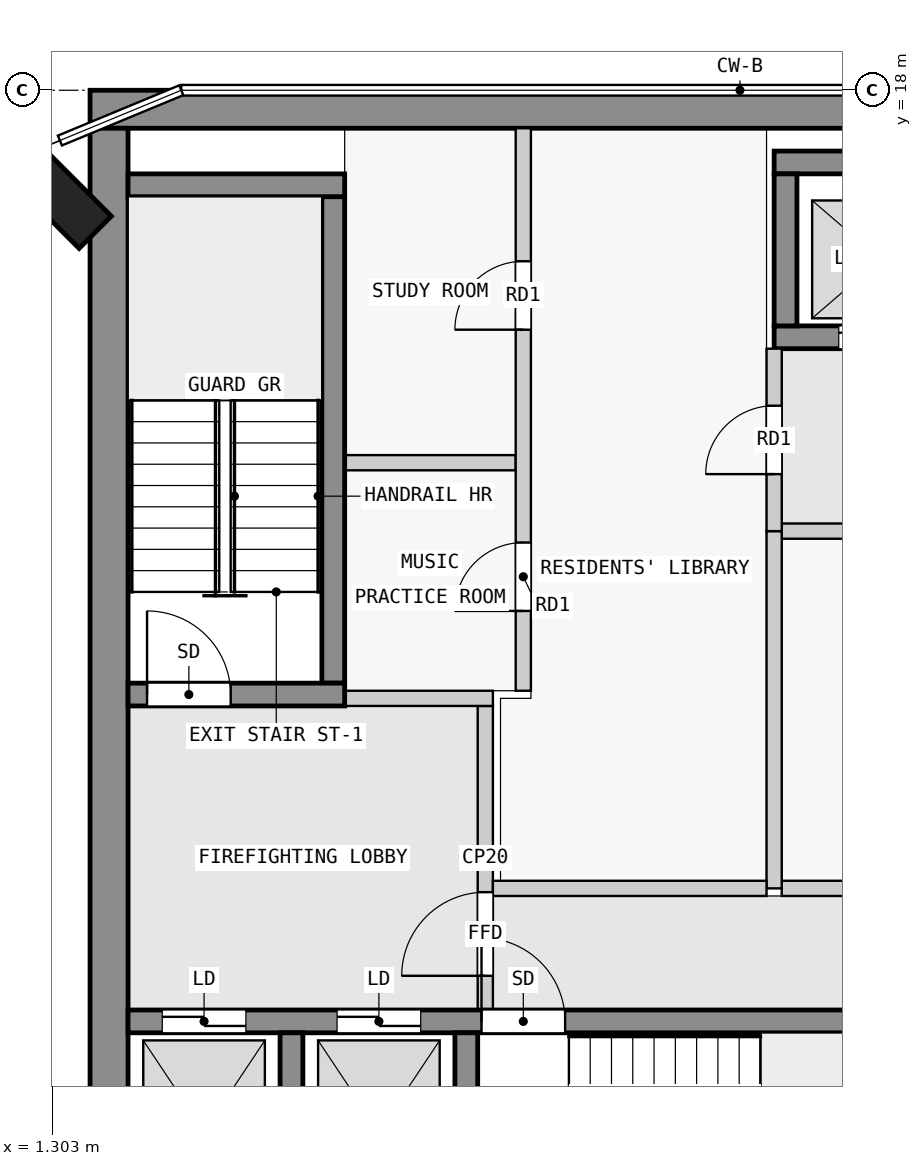
"""IFC4 building model, lengths in metres.
Left out: names, types, materials, properties, quantities, classifications, styles, units other than length and angle.
Written with IfcOpenShell. Run it as: python <this file> out.ifc"""

import sys

from ifc_helpers import new_model, si_unit, direction, frame, frame_2d, origin, origin_2d, place, context, subcontext, project, spatial, rectangle, extrude, element, fill, save


model = new_model("IFC4")
c1 = context("Model", 3, precision=1e-05, world=origin(), true_north=direction((0.0, 1.0)))
c2 = subcontext(c1, "Body", "Model", "MODEL_VIEW")
j1 = project(units=[si_unit("LENGTHUNIT", "METRE"), si_unit("PLANEANGLEUNIT", "RADIAN")], contexts=[c1])
p1 = place(None, origin())
s1 = spatial("IfcSite", under=j1, at=p1, CompositionType="ELEMENT")
p2 = place(p1, origin())
s2 = spatial("IfcBuilding", under=s1, at=p2, CompositionType="ELEMENT")
p3 = place(p2, frame((0.0, 0.0, 232.9)))
s3 = spatial("IfcBuildingStorey", under=s2, at=p3, CompositionType="ELEMENT", Elevation=232.9)
p4 = place(p3, frame((1.374, 16.626, 0.0), z_axis=(0.0, 0.0, 1.0), x_axis=(0.707106781187, 0.707106781187, 0.0)))
e1 = element("IfcColumn", 1, at=p4, inside=s3, PredefinedType="COLUMN", context=c2, shape_type="SweptSolid", body=[
    extrude(rectangle(XDim=0.6, YDim=1.4, at=origin_2d()), origin(), (0.0, 0.0, 1.0), 3.5),
])
p5 = place(p3, frame((1.8, 17.75, 0.0), z_axis=(0.0, 0.0, 1.0), x_axis=(1.0, 0.0, 0.0)))
e2 = element("IfcWall", 2, at=p5, inside=s3, PredefinedType="SHEAR", context=c2, shape_type="SweptSolid", body=[
    extrude(rectangle(XDim=20.7, YDim=0.5, at=frame_2d((10.35, 0.0))), origin(), (0.0, 0.0, 1.0), 3.2),
])
p6 = place(p3, frame((2.05, 2.5, 0.0), z_axis=(0.0, 0.0, 1.0), x_axis=(0.0, 1.0, 0.0)))
e3 = element("IfcWall", 3, at=p6, inside=s3, PredefinedType="SHEAR", context=c2, shape_type="SweptSolid", body=[
    extrude(rectangle(XDim=15.0, YDim=0.5, at=frame_2d((7.5, 0.0))), origin(), (0.0, 0.0, 1.0), 3.2),
])
for number, where, z_axis, x_axis in (
    (4, (4.45, 2.8, 0.0), (0.0, 0.0, 1.0), (0.0, 1.0, 0.0)),
    (5, (6.75, 2.8, 0.0), (0.0, 0.0, 1.0), (0.0, 1.0, 0.0)),
):
    element("IfcWall", number, at=place(p3, frame(where, z_axis=z_axis, x_axis=x_axis)), inside=s3, PredefinedType="SHEAR", context=c2, shape_type="SweptSolid", body=[
        extrude(rectangle(XDim=2.8, YDim=0.3, at=frame_2d((1.4, 0.0))), origin(), (0.0, 0.0, 1.0), 3.2),
    ])
p7 = place(p3, frame((2.3, 5.75, 0.0), z_axis=(0.0, 0.0, 1.0), x_axis=(1.0, 0.0, 0.0)))
e6 = element("IfcWall", 6, at=p7, inside=s3, PredefinedType="SHEAR", context=c2, shape_type="SweptSolid", body=[
    extrude(rectangle(XDim=18.8, YDim=0.3, at=frame_2d((9.4, 0.0))), origin(), (0.0, 0.0, 1.0), 3.2),
])
p8 = place(p7, frame((4.65, 0.0, 0.0)))
e7 = element("IfcOpeningElement", 7, at=p8, cuts=e6, PredefinedType="OPENING", context=c2, shape_type="SweptSolid", body=[
    extrude(rectangle(XDim=1.1, YDim=2.1, at=frame_2d((0.55, 1.05))), frame((0.0, 0.16, 0.0), z_axis=(0.0, -1.0, 0.0), x_axis=(1.0, 0.0, 0.0)), (0.0, 0.0, 1.0), 0.32),
])
p9 = place(p7, frame((0.45, 0.0, 0.0)))
e8 = element("IfcOpeningElement", 8, at=p9, cuts=e6, PredefinedType="OPENING", context=c2, shape_type="SweptSolid", body=[
    extrude(rectangle(XDim=1.1, YDim=2.1, at=frame_2d((0.55, 1.05))), frame((0.0, 0.16, 0.0), z_axis=(0.0, -1.0, 0.0), x_axis=(1.0, 0.0, 0.0)), (0.0, 0.0, 1.0), 0.32),
])
p10 = place(p7, frame((2.75, 0.0, 0.0)))
e9 = element("IfcOpeningElement", 9, at=p10, cuts=e6, PredefinedType="OPENING", context=c2, shape_type="SweptSolid", body=[
    extrude(rectangle(XDim=1.1, YDim=2.1, at=frame_2d((0.55, 1.05))), frame((0.0, 0.16, 0.0), z_axis=(0.0, -1.0, 0.0), x_axis=(1.0, 0.0, 0.0)), (0.0, 0.0, 1.0), 0.32),
])
p11 = place(p7, frame((11.95, 0.0, 0.0)))
e10 = element("IfcOpeningElement", 10, at=p11, cuts=e6, PredefinedType="OPENING", context=c2, shape_type="SweptSolid", body=[
    extrude(rectangle(XDim=0.9, YDim=2.1, at=frame_2d((0.45, 1.05))), frame((0.0, 0.16, 0.0), z_axis=(0.0, -1.0, 0.0), x_axis=(1.0, 0.0, 0.0)), (0.0, 0.0, 1.0), 0.32),
])
p12 = place(p7, frame((15.7, 0.0, 0.0)))
e11 = element("IfcOpeningElement", 11, at=p12, cuts=e6, PredefinedType="OPENING", context=c2, shape_type="SweptSolid", body=[
    extrude(rectangle(XDim=0.9, YDim=2.1, at=frame_2d((0.45, 1.05))), frame((0.0, 0.16, 0.0), z_axis=(0.0, -1.0, 0.0), x_axis=(1.0, 0.0, 0.0)), (0.0, 0.0, 1.0), 0.32),
])
p13 = place(p3, frame((2.3, 10.05, 0.0), z_axis=(0.0, 0.0, 1.0), x_axis=(1.0, 0.0, 0.0)))
e12 = element("IfcWall", 12, at=p13, inside=s3, PredefinedType="SHEAR", context=c2, shape_type="SweptSolid", body=[
    extrude(rectangle(XDim=2.85, YDim=0.3, at=frame_2d((1.425, 0.0))), origin(), (0.0, 0.0, 1.0), 3.2),
])
p14 = place(p13, frame((0.25, 0.0, 0.0)))
e13 = element("IfcOpeningElement", 13, at=p14, cuts=e12, PredefinedType="OPENING", context=c2, shape_type="SweptSolid", body=[
    extrude(rectangle(XDim=1.1, YDim=2.1, at=frame_2d((0.55, 1.05))), frame((0.0, 0.16, 0.0), z_axis=(0.0, -1.0, 0.0), x_axis=(1.0, 0.0, 0.0)), (0.0, 0.0, 1.0), 0.32),
])
p15 = place(p3, frame((5.0, 10.2, 0.0), z_axis=(0.0, 0.0, 1.0), x_axis=(0.0, 1.0, 0.0)))
e14 = element("IfcWall", 14, at=p15, inside=s3, PredefinedType="SHEAR", context=c2, shape_type="SweptSolid", body=[
    extrude(rectangle(XDim=6.4, YDim=0.3, at=frame_2d((3.2, 0.0))), origin(), (0.0, 0.0, 1.0), 3.2),
])
p16 = place(p3, frame((2.3, 16.75, 0.0), z_axis=(0.0, 0.0, 1.0), x_axis=(1.0, 0.0, 0.0)))
e15 = element("IfcWall", 15, at=p16, inside=s3, PredefinedType="SHEAR", context=c2, shape_type="SweptSolid", body=[
    extrude(rectangle(XDim=2.85, YDim=0.3, at=frame_2d((1.425, 0.0))), origin(), (0.0, 0.0, 1.0), 3.2),
])
p17 = place(p3, frame((10.8, 17.05, 0.0), z_axis=(0.0, 0.0, 1.0), x_axis=(1.0, 0.0, 0.0)))
e16 = element("IfcWall", 16, at=p17, inside=s3, PredefinedType="SHEAR", context=c2, shape_type="SweptSolid", body=[
    extrude(rectangle(XDim=7.8, YDim=0.3, at=frame_2d((3.9, 0.0))), origin(), (0.0, 0.0, 1.0), 3.2),
])
p18 = place(p3, frame((10.8, 14.75, 0.0), z_axis=(0.0, 0.0, 1.0), x_axis=(1.0, 0.0, 0.0)))
e17 = element("IfcWall", 17, at=p18, inside=s3, PredefinedType="SHEAR", context=c2, shape_type="SweptSolid", body=[
    extrude(rectangle(XDim=7.8, YDim=0.3, at=frame_2d((3.9, 0.0))), origin(), (0.0, 0.0, 1.0), 3.2),
])
p19 = place(p18, frame((0.85, 0.0, 0.0)))
e18 = element("IfcOpeningElement", 18, at=p19, cuts=e17, PredefinedType="OPENING", context=c2, shape_type="SweptSolid", body=[
    extrude(rectangle(XDim=1.1, YDim=2.1, at=frame_2d((0.55, 1.05))), frame((0.0, 0.16, 0.0), z_axis=(0.0, -1.0, 0.0), x_axis=(1.0, 0.0, 0.0)), (0.0, 0.0, 1.0), 0.32),
])
p20 = place(p18, frame((3.35, 0.0, 0.0)))
e19 = element("IfcOpeningElement", 19, at=p20, cuts=e17, PredefinedType="OPENING", context=c2, shape_type="SweptSolid", body=[
    extrude(rectangle(XDim=1.1, YDim=2.1, at=frame_2d((0.55, 1.05))), frame((0.0, 0.16, 0.0), z_axis=(0.0, -1.0, 0.0), x_axis=(1.0, 0.0, 0.0)), (0.0, 0.0, 1.0), 0.32),
])
p21 = place(p18, frame((5.85, 0.0, 0.0)))
e20 = element("IfcOpeningElement", 20, at=p21, cuts=e17, PredefinedType="OPENING", context=c2, shape_type="SweptSolid", body=[
    extrude(rectangle(XDim=1.1, YDim=2.1, at=frame_2d((0.55, 1.05))), frame((0.0, 0.16, 0.0), z_axis=(0.0, -1.0, 0.0), x_axis=(1.0, 0.0, 0.0)), (0.0, 0.0, 1.0), 0.32),
])
p22 = place(p3, frame((10.95, 14.9, 0.0), z_axis=(0.0, 0.0, 1.0), x_axis=(0.0, 1.0, 0.0)))
e21 = element("IfcWall", 21, at=p22, inside=s3, PredefinedType="SHEAR", context=c2, shape_type="SweptSolid", body=[
    extrude(rectangle(XDim=2.0, YDim=0.3, at=frame_2d((1.0, 0.0))), origin(), (0.0, 0.0, 1.0), 3.2),
])
p23 = place(p3, frame((7.0, 5.9, 0.0), z_axis=(0.0, 0.0, 1.0), x_axis=(0.0, 1.0, 0.0)))
e22 = element("IfcWall", 22, at=p23, inside=s3, PredefinedType="PARTITIONING", context=c2, shape_type="SweptSolid", body=[
    extrude(rectangle(XDim=4.0, YDim=0.2, at=frame_2d((2.0, 0.0))), origin(), (0.0, 0.0, 1.0), 3.2),
])
p24 = place(p23, frame((0.45, 0.0, 0.0)))
e23 = element("IfcOpeningElement", 23, at=p24, cuts=e22, PredefinedType="OPENING", context=c2, shape_type="SweptSolid", body=[
    extrude(rectangle(XDim=1.1, YDim=2.1, at=frame_2d((0.55, 1.05))), frame((0.0, 0.11, 0.0), z_axis=(0.0, -1.0, 0.0), x_axis=(1.0, 0.0, 0.0)), (0.0, 0.0, 1.0), 0.22),
])
p25 = place(p3, frame((5.15, 10.0, 0.0), z_axis=(0.0, 0.0, 1.0), x_axis=(1.0, 0.0, 0.0)))
e24 = element("IfcWall", 24, at=p25, inside=s3, PredefinedType="PARTITIONING", context=c2, shape_type="SweptSolid", body=[
    extrude(rectangle(XDim=1.95, YDim=0.2, at=frame_2d((0.975, 0.0))), origin(), (0.0, 0.0, 1.0), 3.2),
])
p26 = place(p3, frame((7.1, 7.5, 0.0), z_axis=(0.0, 0.0, 1.0), x_axis=(1.0, 0.0, 0.0)))
e25 = element("IfcWall", 25, at=p26, inside=s3, PredefinedType="PARTITIONING", context=c2, shape_type="SweptSolid", body=[
    extrude(rectangle(XDim=3.6, YDim=0.2, at=frame_2d((1.8, 0.0))), origin(), (0.0, 0.0, 1.0), 3.2),
])
p27 = place(p3, frame((10.8, 12.2, 0.0), z_axis=(0.0, 0.0, 1.0), x_axis=(0.0, 1.0, 0.0)))
e26 = element("IfcWall", 26, at=p27, inside=s3, PredefinedType="PARTITIONING", context=c2, shape_type="SweptSolid", body=[
    extrude(rectangle(XDim=2.4, YDim=0.2, at=frame_2d((1.2, 0.0))), origin(), (0.0, 0.0, 1.0), 3.2),
])
p28 = place(p27, frame((0.75, 0.0, 0.0)))
e27 = element("IfcOpeningElement", 27, at=p28, cuts=e26, PredefinedType="OPENING", context=c2, shape_type="SweptSolid", body=[
    extrude(rectangle(XDim=0.9, YDim=2.1, at=frame_2d((0.45, 1.05))), frame((0.0, 0.11, 0.0), z_axis=(0.0, -1.0, 0.0), x_axis=(1.0, 0.0, 0.0)), (0.0, 0.0, 1.0), 0.22),
])
p29 = place(p3, frame((10.8, 7.5, 0.0), z_axis=(0.0, 0.0, 1.0), x_axis=(0.0, 1.0, 0.0)))
e28 = element("IfcWall", 28, at=p29, inside=s3, PredefinedType="PARTITIONING", context=c2, shape_type="SweptSolid", body=[
    extrude(rectangle(XDim=4.7, YDim=0.2, at=frame_2d((2.35, 0.0))), origin(), (0.0, 0.0, 1.0), 3.2),
])
p30 = place(p3, frame((10.9, 7.5, 0.0), z_axis=(0.0, 0.0, 1.0), x_axis=(1.0, 0.0, 0.0)))
e29 = element("IfcWall", 29, at=p30, inside=s3, PredefinedType="PARTITIONING", context=c2, shape_type="SweptSolid", body=[
    extrude(rectangle(XDim=8.6, YDim=0.2, at=frame_2d((4.3, 0.0))), origin(), (0.0, 0.0, 1.0), 3.2),
])
p31 = place(p3, frame((10.9, 12.2, 0.0), z_axis=(0.0, 0.0, 1.0), x_axis=(1.0, 0.0, 0.0)))
e30 = element("IfcWall", 30, at=p31, inside=s3, PredefinedType="PARTITIONING", context=c2, shape_type="SweptSolid", body=[
    extrude(rectangle(XDim=8.6, YDim=0.2, at=frame_2d((4.3, 0.0))), origin(), (0.0, 0.0, 1.0), 3.2),
])
p32 = place(p31, frame((1.425, 0.0, 0.0)))
e31 = element("IfcOpeningElement", 31, at=p32, cuts=e30, PredefinedType="OPENING", context=c2, shape_type="SweptSolid", body=[
    extrude(rectangle(XDim=0.9, YDim=2.1, at=frame_2d((0.45, 1.05))), frame((0.0, 0.11, 0.0), z_axis=(0.0, -1.0, 0.0), x_axis=(1.0, 0.0, 0.0)), (0.0, 0.0, 1.0), 0.22),
])
p33 = place(p31, frame((5.825, 0.0, 0.0)))
e32 = element("IfcOpeningElement", 32, at=p33, cuts=e30, PredefinedType="OPENING", context=c2, shape_type="SweptSolid", body=[
    extrude(rectangle(XDim=0.9, YDim=2.1, at=frame_2d((0.45, 1.05))), frame((0.0, 0.11, 0.0), z_axis=(0.0, -1.0, 0.0), x_axis=(1.0, 0.0, 0.0)), (0.0, 0.0, 1.0), 0.22),
])
p34 = place(p3, frame((7.5, 10.1, 0.0), z_axis=(0.0, 0.0, 1.0), x_axis=(0.0, 1.0, 0.0)))
e33 = element("IfcWall", 33, at=p34, inside=s3, PredefinedType="PARTITIONING", context=c2, shape_type="SweptSolid", body=[
    extrude(rectangle(XDim=7.4, YDim=0.2, at=frame_2d((3.7, 0.0))), origin(), (0.0, 0.0, 1.0), 3.2),
])
p35 = place(p34, frame((1.05, 0.0, 0.0)))
e34 = element("IfcOpeningElement", 34, at=p35, cuts=e33, PredefinedType="OPENING", context=c2, shape_type="SweptSolid", body=[
    extrude(rectangle(XDim=0.9, YDim=2.1, at=frame_2d((0.45, 1.05))), frame((0.0, 0.11, 0.0), z_axis=(0.0, -1.0, 0.0), x_axis=(1.0, 0.0, 0.0)), (0.0, 0.0, 1.0), 0.22),
])
p36 = place(p34, frame((4.75, 0.0, 0.0)))
e35 = element("IfcOpeningElement", 35, at=p36, cuts=e33, PredefinedType="OPENING", context=c2, shape_type="SweptSolid", body=[
    extrude(rectangle(XDim=0.9, YDim=2.1, at=frame_2d((0.45, 1.05))), frame((0.0, 0.11, 0.0), z_axis=(0.0, -1.0, 0.0), x_axis=(1.0, 0.0, 0.0)), (0.0, 0.0, 1.0), 0.22),
])
p37 = place(p3, frame((5.15, 13.1, 0.0), z_axis=(0.0, 0.0, 1.0), x_axis=(1.0, 0.0, 0.0)))
e36 = element("IfcWall", 36, at=p37, inside=s3, PredefinedType="PARTITIONING", context=c2, shape_type="SweptSolid", body=[
    extrude(rectangle(XDim=2.25, YDim=0.2, at=frame_2d((1.125, 0.0))), origin(), (0.0, 0.0, 1.0), 3.2),
])
p38 = place(p24, origin())
e37 = element("IfcDoor", 37, at=p38, inside=s3, OperationType="SINGLE_SWING_LEFT", PredefinedType="DOOR", context=c2, shape_type="SweptSolid", body=[
    extrude(rectangle(XDim=1.1, YDim=2.1, at=frame_2d((0.55, 1.05))), frame((0.0, 0.025, 0.0), z_axis=(0.0, -1.0, 0.0), x_axis=(1.0, 0.0, 0.0)), (0.0, 0.0, 1.0), 0.05),
])
fill(e23, e37)
p39 = place(p14, origin())
e38 = element("IfcDoor", 38, at=p39, inside=s3, OperationType="SINGLE_SWING_RIGHT", PredefinedType="DOOR", context=c2, shape_type="SweptSolid", body=[
    extrude(rectangle(XDim=1.1, YDim=2.1, at=frame_2d((0.55, 1.05))), frame((0.0, 0.025, 0.0), z_axis=(0.0, -1.0, 0.0), x_axis=(1.0, 0.0, 0.0)), (0.0, 0.0, 1.0), 0.05),
])
fill(e13, e38)
p40 = place(p28, origin())
e39 = element("IfcDoor", 39, at=p40, inside=s3, OperationType="SINGLE_SWING_LEFT", PredefinedType="DOOR", context=c2, shape_type="SweptSolid", body=[
    extrude(rectangle(XDim=0.9, YDim=2.1, at=frame_2d((0.45, 1.05))), frame((0.0, 0.025, 0.0), z_axis=(0.0, -1.0, 0.0), x_axis=(1.0, 0.0, 0.0)), (0.0, 0.0, 1.0), 0.05),
])
fill(e27, e39)
p41 = place(p8, origin())
e40 = element("IfcDoor", 40, at=p41, inside=s3, OperationType="SINGLE_SWING_LEFT", PredefinedType="DOOR", context=c2, shape_type="SweptSolid", body=[
    extrude(rectangle(XDim=1.1, YDim=2.1, at=frame_2d((0.55, 1.05))), frame((0.0, 0.025, 0.0), z_axis=(0.0, -1.0, 0.0), x_axis=(1.0, 0.0, 0.0)), (0.0, 0.0, 1.0), 0.05),
])
fill(e7, e40)
p42 = place(p9, origin())
e41 = element("IfcDoor", 41, at=p42, inside=s3, OperationType="DOUBLE_DOOR_SLIDING", PredefinedType="DOOR", context=c2, shape_type="SweptSolid", body=[
    extrude(rectangle(XDim=1.1, YDim=2.1, at=frame_2d((0.55, 1.05))), frame((0.0, 0.025, 0.0), z_axis=(0.0, -1.0, 0.0), x_axis=(1.0, 0.0, 0.0)), (0.0, 0.0, 1.0), 0.05),
])
fill(e8, e41)
p43 = place(p10, origin())
e42 = element("IfcDoor", 42, at=p43, inside=s3, OperationType="DOUBLE_DOOR_SLIDING", PredefinedType="DOOR", context=c2, shape_type="SweptSolid", body=[
    extrude(rectangle(XDim=1.1, YDim=2.1, at=frame_2d((0.55, 1.05))), frame((0.0, 0.025, 0.0), z_axis=(0.0, -1.0, 0.0), x_axis=(1.0, 0.0, 0.0)), (0.0, 0.0, 1.0), 0.05),
])
fill(e9, e42)
p44 = place(p19, origin())
e43 = element("IfcDoor", 43, at=p44, inside=s3, OperationType="DOUBLE_DOOR_SLIDING", PredefinedType="DOOR", context=c2, shape_type="SweptSolid", body=[
    extrude(rectangle(XDim=1.1, YDim=2.1, at=frame_2d((0.55, 1.05))), frame((0.0, 0.025, 0.0), z_axis=(0.0, -1.0, 0.0), x_axis=(1.0, 0.0, 0.0)), (0.0, 0.0, 1.0), 0.05),
])
fill(e18, e43)
p45 = place(p35, origin())
e44 = element("IfcDoor", 44, at=p45, inside=s3, OperationType="SINGLE_SWING_RIGHT", PredefinedType="DOOR", context=c2, shape_type="SweptSolid", body=[
    extrude(rectangle(XDim=0.9, YDim=2.1, at=frame_2d((0.45, 1.05))), frame((0.0, 0.025, 0.0), z_axis=(0.0, -1.0, 0.0), x_axis=(1.0, 0.0, 0.0)), (0.0, 0.0, 1.0), 0.05),
])
fill(e34, e44)
p46 = place(p36, origin())
e45 = element("IfcDoor", 45, at=p46, inside=s3, OperationType="SINGLE_SWING_RIGHT", PredefinedType="DOOR", context=c2, shape_type="SweptSolid", body=[
    extrude(rectangle(XDim=0.9, YDim=2.1, at=frame_2d((0.45, 1.05))), frame((0.0, 0.025, 0.0), z_axis=(0.0, -1.0, 0.0), x_axis=(1.0, 0.0, 0.0)), (0.0, 0.0, 1.0), 0.05),
])
fill(e35, e45)
save(model, sys.argv[1])
